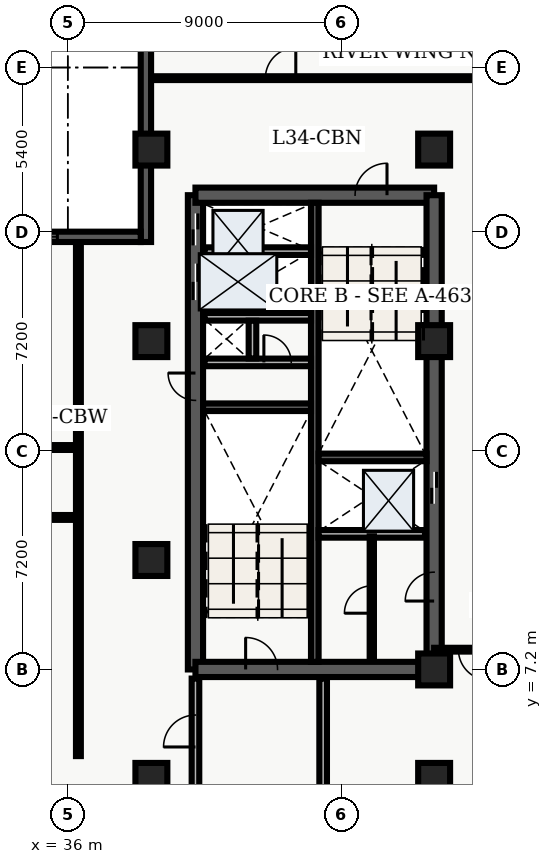
"""IFC4 building model, lengths in metres.
Left out: names, types, materials, properties, quantities, classifications, styles, units other than length and angle.
Written with IfcOpenShell. Run it as: python <this file> out.ifc"""

import sys

from ifc_helpers import new_model, entity, si_unit, converted_unit, direction, frame, origin_with_axes, origin_2d_with_axis, place, context, subcontext, project, spatial, polyline, rectangle, outline, extrude, element, fill, save


model = new_model("IFC4")
c1 = context("Model", 3, precision=1e-05, world=origin_with_axes(), true_north=direction((0.0, 1.0)))
c2 = subcontext(c1, "Body", "Model", "MODEL_VIEW")
j1 = project(units=[si_unit("LENGTHUNIT", "METRE"), converted_unit("PLANEANGLEUNIT", "DEGREE", entity("IfcPlaneAngleMeasure", 0.017), si_unit("PLANEANGLEUNIT", "RADIAN"), dimensions=[0, 0, 0, 0, 0, 0, 0])], contexts=[c1])
p1 = place(None, origin_with_axes())
s1 = spatial("IfcSite", under=j1, at=p1, CompositionType="ELEMENT")
p2 = place(p1, origin_with_axes())
s2 = spatial("IfcBuilding", under=s1, at=p2, CompositionType="ELEMENT")
p3 = place(p2, frame((0.0, 0.0, 140.7), z_axis=(0.0, 0.0, 1.0), x_axis=(1.0, 0.0, 0.0)))
s3 = spatial("IfcBuildingStorey", under=s2, at=p3, CompositionType="ELEMENT", Elevation=140.7)
p4 = place(p3, frame((40.2, 7.2, 0.0), z_axis=(0.0, 0.0, 1.0), x_axis=(0.0, 1.0, 0.0)))
e1 = element("IfcWall", 1, at=p4, inside=s3, PredefinedType="SHEAR", context=c2, shape_type="SweptSolid", body=[
    extrude(outline(polyline([(0.0, -0.25), (15.6, -0.25), (15.6, 0.25), (0.0, 0.25), (0.0, -0.25)])), origin_with_axes(), (0.0, 0.0, 1.0), 3.66),
])
p5 = place(p4, frame((14.475, 0.0, 0.0), z_axis=(0.0, 0.0, 1.0), x_axis=(1.0, 0.0, 0.0)))
e2 = element("IfcOpeningElement", 2, at=p5, cuts=e1, PredefinedType="OPENING", context=c2, shape_type="SweptSolid", body=[
    extrude(rectangle(XDim=1.05, YDim=0.52, at=origin_2d_with_axis()), origin_with_axes(), (0.0, 0.0, 1.0), 2.15),
])
p6 = place(p4, frame((12.75, 0.0, 0.0), z_axis=(0.0, 0.0, 1.0), x_axis=(1.0, 0.0, 0.0)))
e3 = element("IfcOpeningElement", 3, at=p6, cuts=e1, PredefinedType="OPENING", context=c2, shape_type="SweptSolid", body=[
    extrude(rectangle(XDim=1.2, YDim=0.52, at=origin_2d_with_axis()), origin_with_axes(), (0.0, 0.0, 1.0), 2.15),
])
p7 = place(p4, frame((9.3, 0.0, 0.0), z_axis=(0.0, 0.0, 1.0), x_axis=(1.0, 0.0, 0.0)))
e4 = element("IfcOpeningElement", 4, at=p7, cuts=e1, PredefinedType="OPENING", context=c2, shape_type="SweptSolid", body=[
    extrude(rectangle(XDim=0.9, YDim=0.52, at=origin_2d_with_axis()), origin_with_axes(), (0.0, 0.0, 1.0), 2.15),
])
p8 = place(p3, frame((40.2, 7.2, 0.0), z_axis=(0.0, 0.0, 1.0), x_axis=(1.0, 0.0, 0.0)))
e5 = element("IfcWall", 5, at=p8, inside=s3, PredefinedType="SHEAR", context=c2, shape_type="SweptSolid", body=[
    extrude(outline(polyline([(0.0, -0.25), (7.85, -0.25), (7.85, 0.25), (0.0, 0.25), (0.0, -0.25)])), origin_with_axes(), (0.0, 0.0, 1.0), 3.66),
])
p9 = place(p8, frame((2.175, 0.0, 0.0), z_axis=(0.0, 0.0, 1.0), x_axis=(1.0, 0.0, 0.0)))
e6 = element("IfcOpeningElement", 6, at=p9, cuts=e5, PredefinedType="OPENING", context=c2, shape_type="SweptSolid", body=[
    extrude(rectangle(XDim=1.05, YDim=0.52, at=origin_2d_with_axis()), origin_with_axes(), (0.0, 0.0, 1.0), 2.15),
])
p10 = place(p3, frame((40.2, 22.8, 0.0), z_axis=(0.0, 0.0, 1.0), x_axis=(1.0, 0.0, 0.0)))
e7 = element("IfcWall", 7, at=p10, inside=s3, PredefinedType="SHEAR", context=c2, shape_type="SweptSolid", body=[
    extrude(outline(polyline([(0.0, -0.25), (7.85, -0.25), (7.85, 0.25), (0.0, 0.25), (0.0, -0.25)])), origin_with_axes(), (0.0, 0.0, 1.0), 3.66),
])
p11 = place(p10, frame((5.775, 0.0, 0.0), z_axis=(0.0, 0.0, 1.0), x_axis=(1.0, 0.0, 0.0)))
e8 = element("IfcOpeningElement", 8, at=p11, cuts=e7, PredefinedType="OPENING", context=c2, shape_type="SweptSolid", body=[
    extrude(rectangle(XDim=1.05, YDim=0.52, at=origin_2d_with_axis()), origin_with_axes(), (0.0, 0.0, 1.0), 2.15),
])
p12 = place(p3, frame((48.05, 7.2, 0.0), z_axis=(0.0, 0.0, 1.0), x_axis=(0.0, 1.0, 0.0)))
e9 = element("IfcWall", 9, at=p12, inside=s3, PredefinedType="SHEAR", context=c2, shape_type="SweptSolid", body=[
    extrude(outline(polyline([(0.0, -0.25), (15.6, -0.25), (15.6, 0.25), (0.0, 0.25), (0.0, -0.25)])), origin_with_axes(), (0.0, 0.0, 1.0), 3.66),
])
p13 = place(p12, frame((5.975, 0.0, 0.0), z_axis=(0.0, 0.0, 1.0), x_axis=(1.0, 0.0, 0.0)))
e10 = element("IfcOpeningElement", 10, at=p13, cuts=e9, PredefinedType="OPENING", context=c2, shape_type="SweptSolid", body=[
    extrude(rectangle(XDim=1.05, YDim=0.52, at=origin_2d_with_axis()), origin_with_axes(), (0.0, 0.0, 1.0), 2.15),
])
p14 = place(p12, frame((2.725, 0.0, 0.0), z_axis=(0.0, 0.0, 1.0), x_axis=(1.0, 0.0, 0.0)))
e11 = element("IfcOpeningElement", 11, at=p14, cuts=e9, PredefinedType="OPENING", context=c2, shape_type="SweptSolid", body=[
    extrude(rectangle(XDim=0.95, YDim=0.52, at=origin_2d_with_axis()), origin_with_axes(), (0.0, 0.0, 1.0), 2.15),
])
p15 = place(p3, frame((44.125, 7.45, 0.0), z_axis=(0.0, 0.0, 1.0), x_axis=(0.0, 1.0, 0.0)))
e12 = element("IfcWall", 12, at=p15, inside=s3, PredefinedType="SHEAR", context=c2, shape_type="SweptSolid", body=[
    extrude(outline(polyline([(0.0, -0.125), (15.1, -0.125), (15.1, 0.125), (0.0, 0.125), (0.0, -0.125)])), origin_with_axes(), (0.0, 0.0, 1.0), 3.66),
])
for number, where, z_axis, x_axis in (
    (13, (40.45, 15.825, 0.0), (0.0, 0.0, 1.0), (1.0, 0.0, 0.0)),
    (14, (44.25, 14.175, 0.0), (0.0, 0.0, 1.0), (1.0, 0.0, 0.0)),
):
    element("IfcWall", number, at=place(p3, frame(where, z_axis=z_axis, x_axis=x_axis)), inside=s3, PredefinedType="SHEAR", context=c2, shape_type="SweptSolid", body=[
        extrude(outline(polyline([(0.0, -0.125), (3.55, -0.125), (3.55, 0.125), (0.0, 0.125), (0.0, -0.125)])), origin_with_axes(), (0.0, 0.0, 1.0), 3.66),
    ])
p16 = place(p3, frame((40.5, 17.3, 0.0), z_axis=(0.0, 0.0, 1.0), x_axis=(1.0, 0.0, 0.0)))
e15 = element("IfcWall", 15, at=p16, inside=s3, PredefinedType="SOLIDWALL", context=c2, shape_type="SweptSolid", body=[
    extrude(outline(polyline([(0.0, -0.125), (3.5, -0.125), (3.5, 0.125), (0.0, 0.125), (0.0, -0.125)])), origin_with_axes(), (0.0, 0.0, 1.0), 2.7),
])
p17 = place(p16, frame((2.4, 0.0, 0.0), z_axis=(0.0, 0.0, 1.0), x_axis=(1.0, 0.0, 0.0)))
e16 = element("IfcOpeningElement", 16, at=p17, cuts=e15, PredefinedType="OPENING", context=c2, shape_type="SweptSolid", body=[
    extrude(rectangle(XDim=0.9, YDim=0.27, at=origin_2d_with_axis()), origin_with_axes(), (0.0, 0.0, 1.0), 2.15),
])
p18 = place(p3, frame((40.5, 18.8, 0.0), z_axis=(0.0, 0.0, 1.0), x_axis=(1.0, 0.0, 0.0)))
e17 = element("IfcWall", 17, at=p18, inside=s3, PredefinedType="SOLIDWALL", context=c2, shape_type="SweptSolid", body=[
    extrude(outline(polyline([(0.0, -0.125), (3.5, -0.125), (3.5, 0.125), (0.0, 0.125), (0.0, -0.125)])), origin_with_axes(), (0.0, 0.0, 1.0), 2.7),
])
p19 = place(p3, frame((42.075, 17.43, 0.0), z_axis=(0.0, 0.0, 1.0), x_axis=(0.0, 1.0, 0.0)))
e18 = element("IfcWall", 18, at=p19, inside=s3, PredefinedType="SOLIDWALL", context=c2, shape_type="SweptSolid", body=[
    extrude(outline(polyline([(0.0, -0.125), (1.24, -0.125), (1.24, 0.125), (0.0, 0.125), (0.0, -0.125)])), origin_with_axes(), (0.0, 0.0, 1.0), 2.7),
])
p20 = place(p3, frame((40.2, 3.1, 0.0), z_axis=(0.0, 0.0, 1.0), x_axis=(0.0, 1.0, 0.0)))
e19 = element("IfcWall", 19, at=p20, inside=s3, PredefinedType="SOLIDWALL", context=c2, shape_type="SweptSolid", body=[
    extrude(outline(polyline([(0.0, -0.125), (3.8, -0.125), (3.8, 0.125), (0.0, 0.125), (0.0, -0.125)])), origin_with_axes(), (0.0, 0.0, 1.0), 2.7),
])
p21 = place(p20, frame((2.075, 0.0, 0.0), z_axis=(0.0, 0.0, 1.0), x_axis=(1.0, 0.0, 0.0)))
e20 = element("IfcOpeningElement", 20, at=p21, cuts=e19, PredefinedType="OPENING", context=c2, shape_type="SweptSolid", body=[
    extrude(rectangle(XDim=1.05, YDim=0.27, at=origin_2d_with_axis()), origin_with_axes(), (0.0, 0.0, 1.0), 2.15),
])
p22 = place(p3, frame((44.4, 3.1, 0.0), z_axis=(0.0, 0.0, 1.0), x_axis=(0.0, 1.0, 0.0)))
e21 = element("IfcWall", 21, at=p22, inside=s3, PredefinedType="SOLIDWALL", context=c2, shape_type="SweptSolid", body=[
    extrude(outline(polyline([(0.0, -0.125), (3.8, -0.125), (3.8, 0.125), (0.0, 0.125), (0.0, -0.125)])), origin_with_axes(), (0.0, 0.0, 1.0), 2.7),
])
for number, where, z_axis, x_axis in (
    (22, (38.75, 3.6, 0.0), (0.0, 0.0, 1.0), (1.0, 0.0, 0.0)),
    (23, (38.75, 10.8, 0.0), (0.0, 0.0, 1.0), (1.0, 0.0, 0.0)),
    (24, (38.75, 18.0, 0.0), (0.0, 0.0, 1.0), (1.0, 0.0, 0.0)),
    (25, (38.75, 24.3, 0.0), (0.0, 0.0, 1.0), (1.0, 0.0, 0.0)),
    (26, (48.05, 3.6, 0.0), (0.0, 0.0, 1.0), (1.0, 0.0, 0.0)),
    (27, (48.05, 7.2, 0.0), (0.0, 0.0, 1.0), (1.0, 0.0, 0.0)),
    (28, (48.05, 18.0, 0.0), (0.0, 0.0, 1.0), (1.0, 0.0, 0.0)),
    (29, (48.05, 24.3, 0.0), (0.0, 0.0, 1.0), (1.0, 0.0, 0.0)),
):
    element("IfcColumn", number, at=place(p3, frame(where, z_axis=z_axis, x_axis=x_axis)), inside=s3, PredefinedType="COLUMN", context=c2, shape_type="SweptSolid", body=[
        extrude(rectangle(XDim=1.05, YDim=1.05, at=origin_2d_with_axis()), origin_with_axes(), (0.0, 0.0, 1.0), 3.9),
    ])
for number, where, z_axis, x_axis in (
    (30, (40.5, 20.96, 0.0), (0.0, 0.0, 1.0), (1.0, 0.0, 0.0)),
    (31, (44.25, 11.66, 0.0), (0.0, 0.0, 1.0), (1.0, 0.0, 0.0)),
):
    element("IfcWall", number, at=place(p3, frame(where, z_axis=z_axis, x_axis=x_axis)), inside=s3, PredefinedType="SOLIDWALL", context=c2, shape_type="SweptSolid", body=[
        extrude(outline(polyline([(0.0, -0.125), (3.5, -0.125), (3.5, 0.125), (0.0, 0.125), (0.0, -0.125)])), origin_with_axes(), (0.0, 0.0, 1.0), 2.7),
    ])
p23 = place(p3, frame((46.0, 7.5, 0.0), z_axis=(0.0, 0.0, 1.0), x_axis=(0.0, 1.0, 0.0)))
e32 = element("IfcWall", 32, at=p23, inside=s3, PredefinedType="PARTITIONING", context=c2, shape_type="SweptSolid", body=[
    extrude(outline(polyline([(0.0, -0.07), (4.08, -0.07), (4.08, 0.07), (0.0, 0.07), (0.0, -0.07)])), origin_with_axes(), (0.0, 0.0, 1.0), 2.7),
])
p24 = place(p23, frame((2.0, 0.0, 0.0), z_axis=(0.0, 0.0, 1.0), x_axis=(1.0, 0.0, 0.0)))
e33 = element("IfcOpeningElement", 33, at=p24, cuts=e32, PredefinedType="OPENING", context=c2, shape_type="SweptSolid", body=[
    extrude(rectangle(XDim=0.9, YDim=0.16, at=origin_2d_with_axis()), origin_with_axes(), (0.0, 0.0, 1.0), 2.15),
])
p25 = place(p3, frame((21.15, 12.2, 0.0), z_axis=(0.0, 0.0, 1.0), x_axis=(1.0, 0.0, 0.0)))
e34 = element("IfcWall", 34, at=p25, inside=s3, PredefinedType="PARTITIONING", context=c2, shape_type="SweptSolid", body=[
    extrude(outline(polyline([(0.0, -0.08), (15.2, -0.08), (15.2, 0.08), (0.0, 0.08), (0.0, -0.08)])), origin_with_axes(), (0.0, 0.0, 1.0), 2.7),
])
p26 = place(p25, frame((1.764, 0.0, 0.0), z_axis=(0.0, 0.0, 1.0), x_axis=(1.0, 0.0, 0.0)))
e35 = element("IfcOpeningElement", 35, at=p26, cuts=e34, PredefinedType="OPENING", context=c2, shape_type="SweptSolid", body=[
    extrude(rectangle(XDim=1.0, YDim=0.18, at=origin_2d_with_axis()), origin_with_axes(), (0.0, 0.0, 1.0), 2.15),
])
p27 = place(p25, frame((4.34, 0.0, 0.0), z_axis=(0.0, 0.0, 1.0), x_axis=(1.0, 0.0, 0.0)))
e36 = element("IfcOpeningElement", 36, at=p27, cuts=e34, PredefinedType="OPENING", context=c2, shape_type="SweptSolid", body=[
    extrude(rectangle(XDim=1.0, YDim=0.18, at=origin_2d_with_axis()), origin_with_axes(), (0.0, 0.0, 1.0), 2.15),
])
p28 = place(p25, frame((8.545, 0.0, 0.0), z_axis=(0.0, 0.0, 1.0), x_axis=(1.0, 0.0, 0.0)))
e37 = element("IfcOpeningElement", 37, at=p28, cuts=e34, PredefinedType="OPENING", context=c2, shape_type="SweptSolid", body=[
    extrude(rectangle(XDim=1.0, YDim=0.18, at=origin_2d_with_axis()), origin_with_axes(), (0.0, 0.0, 1.0), 2.15),
])
p29 = place(p25, frame((12.88, 0.0, 0.0), z_axis=(0.0, 0.0, 1.0), x_axis=(1.0, 0.0, 0.0)))
e38 = element("IfcOpeningElement", 38, at=p29, cuts=e34, PredefinedType="OPENING", context=c2, shape_type="SweptSolid", body=[
    extrude(rectangle(XDim=1.0, YDim=0.18, at=origin_2d_with_axis()), origin_with_axes(), (0.0, 0.0, 1.0), 2.15),
])
p30 = place(p3, frame((21.15, 14.5, 0.0), z_axis=(0.0, 0.0, 1.0), x_axis=(1.0, 0.0, 0.0)))
e39 = element("IfcWall", 39, at=p30, inside=s3, PredefinedType="PARTITIONING", context=c2, shape_type="SweptSolid", body=[
    extrude(outline(polyline([(0.0, -0.08), (15.2, -0.08), (15.2, 0.08), (0.0, 0.08), (0.0, -0.08)])), origin_with_axes(), (0.0, 0.0, 1.0), 2.7),
])
p31 = place(p30, frame((7.65, 0.0, 0.0), z_axis=(0.0, 0.0, 1.0), x_axis=(1.0, 0.0, 0.0)))
e40 = element("IfcOpeningElement", 40, at=p31, cuts=e39, PredefinedType="OPENING", context=c2, shape_type="SweptSolid", body=[
    extrude(rectangle(XDim=1.2, YDim=0.18, at=origin_2d_with_axis()), origin_with_axes(), (0.0, 0.0, 1.0), 2.2),
])
p32 = place(p3, frame((36.35, 4.35, 0.0), z_axis=(0.0, 0.0, 1.0), x_axis=(0.0, 1.0, 0.0)))
e41 = element("IfcWall", 41, at=p32, inside=s3, PredefinedType="PARTITIONING", context=c2, shape_type="SweptSolid", body=[
    extrude(outline(polyline([(0.0, -0.08), (16.95, -0.08), (16.95, 0.08), (0.0, 0.08), (0.0, -0.08)])), origin_with_axes(), (0.0, 0.0, 1.0), 2.7),
])
p33 = place(p3, frame((59.665, 7.85, 0.0), z_axis=(0.0, 0.0, 1.0), x_axis=(-1.0, 0.0, 0.0)))
e42 = element("IfcWall", 42, at=p33, inside=s3, PredefinedType="PARTITIONING", context=c2, shape_type="SweptSolid", body=[
    extrude(outline(polyline([(0.0, -0.062), (11.615, -0.062), (11.615, 0.062), (0.0, 0.062), (0.0, -0.062)])), origin_with_axes(), (0.0, 0.0, 1.0), 2.7),
])
p34 = place(p33, frame((10.315, 0.0, 0.0), z_axis=(0.0, 0.0, 1.0), x_axis=(1.0, 0.0, 0.0)))
e43 = element("IfcOpeningElement", 43, at=p34, cuts=e42, PredefinedType="OPENING", context=c2, shape_type="SweptSolid", body=[
    extrude(rectangle(XDim=1.0, YDim=0.145, at=origin_2d_with_axis()), origin_with_axes(), (0.0, 0.0, 1.0), 2.15),
])
p35 = place(p3, frame((38.735, 26.65, 0.0), z_axis=(0.0, 0.0, 1.0), x_axis=(1.0, 0.0, 0.0)))
e44 = element("IfcWall", 44, at=p35, inside=s3, PredefinedType="PARTITIONING", context=c2, shape_type="SweptSolid", body=[
    extrude(outline(polyline([(0.0, -0.062), (20.905, -0.062), (20.905, 0.062), (0.0, 0.062), (0.0, -0.062)])), origin_with_axes(), (0.0, 0.0, 1.0), 2.7),
])
p36 = place(p35, frame((4.265, 0.0, 0.0), z_axis=(0.0, 0.0, 1.0), x_axis=(1.0, 0.0, 0.0)))
e45 = element("IfcOpeningElement", 45, at=p36, cuts=e44, PredefinedType="OPENING", context=c2, shape_type="SweptSolid", body=[
    extrude(rectangle(XDim=1.0, YDim=0.145, at=origin_2d_with_axis()), origin_with_axes(), (0.0, 0.0, 1.0), 2.15),
])
p37 = place(p3, frame((38.57, 21.26, 0.0), z_axis=(0.0, 0.0, 1.0), x_axis=(0.0, 1.0, 0.0)))
e46 = element("IfcWall", 46, at=p37, inside=s3, PredefinedType="SOLIDWALL", context=c2, shape_type="SweptSolid", body=[
    extrude(outline(polyline([(0.0, -0.17), (7.54, -0.17), (7.54, 0.17), (0.0, 0.17), (0.0, -0.17)])), origin_with_axes(), (0.0, 0.0, 1.0), 3.66),
])
p38 = place(p3, frame((21.649, 21.43, 0.0), z_axis=(0.0, 0.0, 1.0), x_axis=(1.0, 0.0, 0.0)))
e47 = element("IfcWall", 47, at=p38, inside=s3, PredefinedType="SOLIDWALL", context=c2, shape_type="SweptSolid", body=[
    extrude(outline(polyline([(0.0, -0.17), (16.751, -0.17), (16.751, 0.17), (0.0, 0.17), (0.0, -0.17)])), origin_with_axes(), (0.0, 0.0, 1.0), 3.66),
])
p39 = place(p38, frame((3.192, 0.0, 0.45), z_axis=(0.0, 0.0, 1.0), x_axis=(1.0, 0.0, 0.0)))
e48 = element("IfcOpeningElement", 48, at=p39, cuts=e47, PredefinedType="OPENING", context=c2, shape_type="SweptSolid", body=[
    extrude(rectangle(XDim=1.8, YDim=0.36, at=origin_2d_with_axis()), origin_with_axes(), (0.0, 0.0, 1.0), 2.1),
])
p40 = place(p38, frame((8.375, 0.0, 0.45), z_axis=(0.0, 0.0, 1.0), x_axis=(1.0, 0.0, 0.0)))
e49 = element("IfcOpeningElement", 49, at=p40, cuts=e47, PredefinedType="OPENING", context=c2, shape_type="SweptSolid", body=[
    extrude(rectangle(XDim=1.8, YDim=0.36, at=origin_2d_with_axis()), origin_with_axes(), (0.0, 0.0, 1.0), 2.1),
])
p41 = place(p38, frame((13.109, 0.0, 0.45), z_axis=(0.0, 0.0, 1.0), x_axis=(1.0, 0.0, 0.0)))
e50 = element("IfcOpeningElement", 50, at=p41, cuts=e47, PredefinedType="OPENING", context=c2, shape_type="SweptSolid", body=[
    extrude(rectangle(XDim=1.8, YDim=0.36, at=origin_2d_with_axis()), origin_with_axes(), (0.0, 0.0, 1.0), 2.1),
])
p42 = place(p12, frame((5.975, 0.0, 0.0), z_axis=(0.0, 0.0, 1.0), x_axis=(1.0, 0.0, 0.0)))
e51 = element("IfcDoor", 51, at=p42, inside=s3, OperationType="SLIDING_TO_LEFT", PredefinedType="DOOR", context=c2, shape_type="SweptSolid", body=[
    extrude(rectangle(XDim=1.05, YDim=0.09, at=origin_2d_with_axis()), origin_with_axes(), (0.0, 0.0, 1.0), 2.15),
])
fill(e10, e51)
p43 = place(p4, frame((14.475, 0.0, 0.0), z_axis=(0.0, 0.0, 1.0), x_axis=(1.0, 0.0, 0.0)))
e52 = element("IfcDoor", 52, at=p43, inside=s3, OperationType="SLIDING_TO_RIGHT", PredefinedType="DOOR", context=c2, shape_type="SweptSolid", body=[
    extrude(rectangle(XDim=1.05, YDim=0.09, at=origin_2d_with_axis()), origin_with_axes(), (0.0, 0.0, 1.0), 2.15),
])
fill(e2, e52)
p44 = place(p4, frame((12.75, 0.0, 0.0), z_axis=(0.0, 0.0, 1.0), x_axis=(1.0, 0.0, 0.0)))
e53 = element("IfcDoor", 53, at=p44, inside=s3, OperationType="DOUBLE_DOOR_SLIDING", PredefinedType="DOOR", context=c2, shape_type="SweptSolid", body=[
    extrude(rectangle(XDim=1.2, YDim=0.09, at=origin_2d_with_axis()), origin_with_axes(), (0.0, 0.0, 1.0), 2.15),
])
fill(e3, e53)
p45 = place(p4, frame((9.3, 0.0, 0.0), z_axis=(0.0, 0.0, 1.0), x_axis=(1.0, 0.0, 0.0)))
e54 = element("IfcDoor", 54, at=p45, inside=s3, OperationType="SINGLE_SWING_RIGHT", PredefinedType="DOOR", context=c2, shape_type="SweptSolid", body=[
    extrude(rectangle(XDim=0.9, YDim=0.09, at=origin_2d_with_axis()), origin_with_axes(), (0.0, 0.0, 1.0), 2.15),
])
fill(e4, e54)
p46 = place(p16, frame((2.4, 0.0, 0.0), z_axis=(0.0, 0.0, 1.0), x_axis=(1.0, 0.0, 0.0)))
e55 = element("IfcDoor", 55, at=p46, inside=s3, OperationType="SINGLE_SWING_LEFT", PredefinedType="DOOR", context=c2, shape_type="SweptSolid", body=[
    extrude(rectangle(XDim=0.9, YDim=0.09, at=origin_2d_with_axis()), origin_with_axes(), (0.0, 0.0, 1.0), 2.15),
])
fill(e16, e55)
p47 = place(p8, frame((2.175, 0.0, 0.0), z_axis=(0.0, 0.0, 1.0), x_axis=(1.0, 0.0, 0.0)))
e56 = element("IfcDoor", 56, at=p47, inside=s3, OperationType="SINGLE_SWING_LEFT", PredefinedType="DOOR", context=c2, shape_type="SweptSolid", body=[
    extrude(rectangle(XDim=1.05, YDim=0.09, at=origin_2d_with_axis()), origin_with_axes(), (0.0, 0.0, 1.0), 2.15),
])
fill(e6, e56)
p48 = place(p10, frame((5.775, 0.0, 0.0), z_axis=(0.0, 0.0, 1.0), x_axis=(1.0, 0.0, 0.0)))
e57 = element("IfcDoor", 57, at=p48, inside=s3, OperationType="SINGLE_SWING_RIGHT", PredefinedType="DOOR", context=c2, shape_type="SweptSolid", body=[
    extrude(rectangle(XDim=1.05, YDim=0.09, at=origin_2d_with_axis()), origin_with_axes(), (0.0, 0.0, 1.0), 2.15),
])
fill(e8, e57)
p49 = place(p20, frame((2.075, 0.0, 0.0), z_axis=(0.0, 0.0, 1.0), x_axis=(1.0, 0.0, 0.0)))
e58 = element("IfcDoor", 58, at=p49, inside=s3, OperationType="SINGLE_SWING_LEFT", PredefinedType="DOOR", context=c2, shape_type="SweptSolid", body=[
    extrude(rectangle(XDim=1.05, YDim=0.09, at=origin_2d_with_axis()), origin_with_axes(), (0.0, 0.0, 1.0), 2.15),
])
fill(e20, e58)
p50 = place(p23, frame((2.0, 0.0, 0.0), z_axis=(0.0, 0.0, 1.0), x_axis=(1.0, 0.0, 0.0)))
e59 = element("IfcDoor", 59, at=p50, inside=s3, OperationType="SINGLE_SWING_LEFT", PredefinedType="DOOR", context=c2, shape_type="SweptSolid", body=[
    extrude(rectangle(XDim=0.9, YDim=0.084, at=origin_2d_with_axis()), origin_with_axes(), (0.0, 0.0, 1.0), 2.15),
])
fill(e33, e59)
p51 = place(p12, frame((2.725, 0.0, 0.0), z_axis=(0.0, 0.0, 1.0), x_axis=(1.0, 0.0, 0.0)))
e60 = element("IfcDoor", 60, at=p51, inside=s3, OperationType="SINGLE_SWING_LEFT", PredefinedType="DOOR", context=c2, shape_type="SweptSolid", body=[
    extrude(rectangle(XDim=0.95, YDim=0.09, at=origin_2d_with_axis()), origin_with_axes(), (0.0, 0.0, 1.0), 2.15),
])
fill(e11, e60)
p52 = place(p33, frame((10.315, 0.0, 0.0), z_axis=(0.0, 0.0, 1.0), x_axis=(1.0, 0.0, 0.0)))
e61 = element("IfcDoor", 61, at=p52, inside=s3, OperationType="SINGLE_SWING_LEFT", PredefinedType="DOOR", context=c2, shape_type="SweptSolid", body=[
    extrude(rectangle(XDim=1.0, YDim=0.075, at=origin_2d_with_axis()), origin_with_axes(), (0.0, 0.0, 1.0), 2.15),
])
fill(e43, e61)
p53 = place(p35, frame((4.265, 0.0, 0.0), z_axis=(0.0, 0.0, 1.0), x_axis=(1.0, 0.0, 0.0)))
e62 = element("IfcDoor", 62, at=p53, inside=s3, OperationType="SINGLE_SWING_RIGHT", PredefinedType="DOOR", context=c2, shape_type="SweptSolid", body=[
    extrude(rectangle(XDim=1.0, YDim=0.075, at=origin_2d_with_axis()), origin_with_axes(), (0.0, 0.0, 1.0), 2.15),
])
fill(e45, e62)
p54 = place(p38, frame((13.109, 0.0, 0.45), z_axis=(0.0, 0.0, 1.0), x_axis=(1.0, 0.0, 0.0)))
e63 = element("IfcWindow", 63, at=p54, inside=s3, PredefinedType="WINDOW", context=c2, shape_type="SweptSolid", body=[
    extrude(rectangle(XDim=1.8, YDim=0.09, at=origin_2d_with_axis()), origin_with_axes(), (0.0, 0.0, 1.0), 2.1),
])
fill(e50, e63)
save(model, sys.argv[1])
